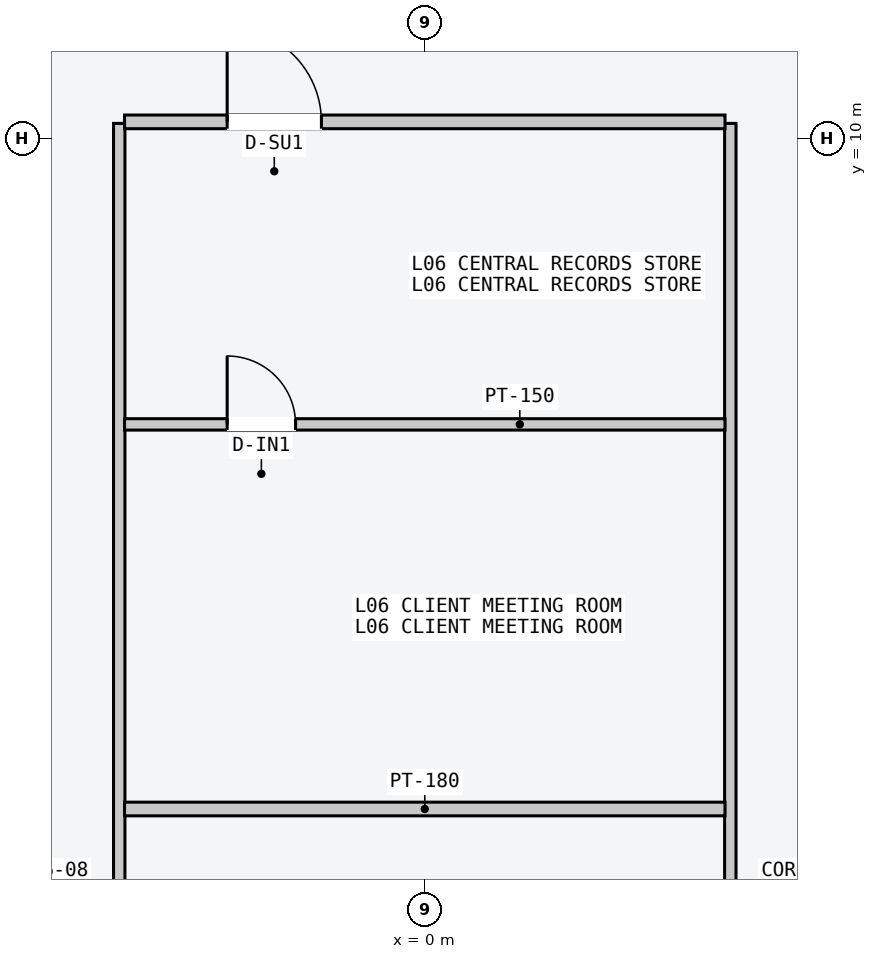
"""IFC4 building model, lengths in metres.
Left out: names, types, materials, properties, quantities, classifications, styles, units other than length and angle.
Written with IfcOpenShell. Run it as: python <this file> out.ifc"""

import sys

from ifc_helpers import new_model, si_unit, direction, frame, frame_2d, origin, place, context, subcontext, project, spatial, rectangle, extrude, element, fill, save


model = new_model("IFC4")
c1 = context("Model", 3, precision=1e-05, world=origin(), true_north=direction((0.0, 1.0)))
c2 = subcontext(c1, "Body", "Model", "MODEL_VIEW")
j1 = project(units=[si_unit("LENGTHUNIT", "METRE"), si_unit("PLANEANGLEUNIT", "RADIAN")], contexts=[c1])
p1 = place(None, origin())
s1 = spatial("IfcSite", under=j1, at=p1, CompositionType="ELEMENT")
p2 = place(p1, origin())
s2 = spatial("IfcBuilding", under=s1, at=p2, CompositionType="ELEMENT")
p3 = place(p2, frame((0.0, 0.0, 27.6)))
s3 = spatial("IfcBuildingStorey", under=s2, at=p3, CompositionType="ELEMENT", Elevation=27.6)
for number, where, z_axis, x_axis in (
    (1, (-4.02, -10.2, 0.0), (0.0, 0.0, 1.0), (0.0, 1.0, 0.0)),
    (2, (4.02, -10.2, 0.0), (0.0, 0.0, 1.0), (0.0, 1.0, 0.0)),
):
    element("IfcWall", number, at=place(p3, frame(where, z_axis=z_axis, x_axis=x_axis)), inside=s3, PredefinedType="PARTITIONING", context=c2, shape_type="SweptSolid", body=[
        extrude(rectangle(XDim=20.4, YDim=0.15, at=frame_2d((10.2, 0.0))), origin(), (0.0, 0.0, 1.0), 3.4),
    ])
p4 = place(p3, frame((-3.95, 1.18, 0.0), z_axis=(0.0, 0.0, 1.0), x_axis=(1.0, 0.0, 0.0)))
e3 = element("IfcWall", 3, at=p4, inside=s3, PredefinedType="PARTITIONING", context=c2, shape_type="SweptSolid", body=[
    extrude(rectangle(XDim=7.9, YDim=0.18, at=frame_2d((3.95, 0.0))), origin(), (0.0, 0.0, 1.0), 3.4),
])
p5 = place(p3, frame((-3.95, 10.22, 0.0), z_axis=(0.0, 0.0, 1.0), x_axis=(1.0, 0.0, 0.0)))
e4 = element("IfcWall", 4, at=p5, inside=s3, PredefinedType="PARTITIONING", context=c2, shape_type="SweptSolid", body=[
    extrude(rectangle(XDim=7.9, YDim=0.18, at=frame_2d((3.95, 0.0))), origin(), (0.0, 0.0, 1.0), 3.4),
])
p6 = place(p5, frame((1.35, 0.0, 0.0)))
e5 = element("IfcOpeningElement", 5, at=p6, cuts=e4, PredefinedType="OPENING", context=c2, shape_type="SweptSolid", body=[
    extrude(rectangle(XDim=1.24, YDim=2.24, at=frame_2d((0.62, 1.12))), frame((0.0, 0.1, 0.0), z_axis=(0.0, -1.0, 0.0), x_axis=(1.0, 0.0, 0.0)), (0.0, 0.0, 1.0), 0.2),
])
p7 = place(p3, frame((-3.95, 6.24, 0.0), z_axis=(0.0, 0.0, 1.0), x_axis=(1.0, 0.0, 0.0)))
e6 = element("IfcWall", 6, at=p7, inside=s3, PredefinedType="PARTITIONING", context=c2, shape_type="SweptSolid", body=[
    extrude(rectangle(XDim=7.9, YDim=0.15, at=frame_2d((3.95, 0.0))), origin(), (0.0, 0.0, 1.0), 3.4),
])
p8 = place(p7, frame((1.35, 0.0, 0.0)))
e7 = element("IfcOpeningElement", 7, at=p8, cuts=e6, PredefinedType="OPENING", context=c2, shape_type="SweptSolid", body=[
    extrude(rectangle(XDim=0.9, YDim=2.15, at=frame_2d((0.45, 1.075))), frame((0.0, 0.085, 0.0), z_axis=(0.0, -1.0, 0.0), x_axis=(1.0, 0.0, 0.0)), (0.0, 0.0, 1.0), 0.17),
])
p9 = place(p6, origin())
e8 = element("IfcDoor", 8, at=p9, inside=s3, OperationType="SINGLE_SWING_LEFT", PredefinedType="DOOR", context=c2, shape_type="SweptSolid", body=[
    extrude(rectangle(XDim=1.24, YDim=2.24, at=frame_2d((0.62, 1.12))), frame((0.0, 0.025, 0.0), z_axis=(0.0, -1.0, 0.0), x_axis=(1.0, 0.0, 0.0)), (0.0, 0.0, 1.0), 0.05),
])
fill(e5, e8)
p10 = place(p8, origin())
e9 = element("IfcDoor", 9, at=p10, inside=s3, OperationType="SINGLE_SWING_LEFT", PredefinedType="DOOR", context=c2, shape_type="SweptSolid", body=[
    extrude(rectangle(XDim=0.9, YDim=2.15, at=frame_2d((0.45, 1.075))), frame((0.0, 0.025, 0.0), z_axis=(0.0, -1.0, 0.0), x_axis=(1.0, 0.0, 0.0)), (0.0, 0.0, 1.0), 0.05),
])
fill(e7, e9)
save(model, sys.argv[1])
